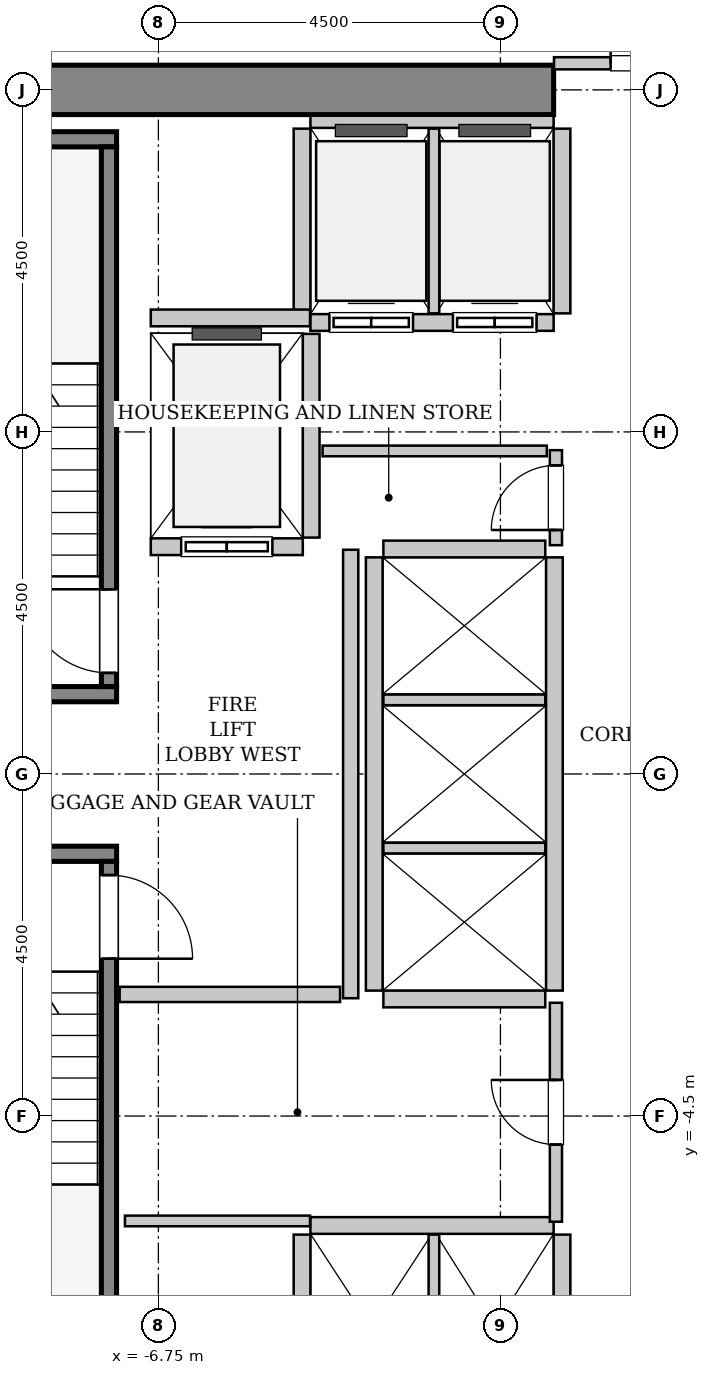
"""IFC4 building model, lengths in metres.
Left out: names, types, materials, properties, quantities, classifications, styles, units other than length and angle.
Written with IfcOpenShell. Run it as: python <this file> out.ifc"""

import sys

from ifc_helpers import new_model, si_unit, direction, frame, frame_2d, origin, place, context, subcontext, project, spatial, rectangle, extrude, source, transform, mapped, element, fill, save


model = new_model("IFC4")
c1 = context("Model", 3, precision=1e-05, world=origin(), true_north=direction((0.0, 1.0)))
c2 = subcontext(c1, "Body", "Model", "MODEL_VIEW")
j1 = project(units=[si_unit("LENGTHUNIT", "METRE"), si_unit("PLANEANGLEUNIT", "RADIAN")], contexts=[c1])
p1 = place(None, origin())
s1 = spatial("IfcSite", under=j1, at=p1, CompositionType="ELEMENT")
p2 = place(p1, origin())
s2 = spatial("IfcBuilding", under=s1, at=p2, CompositionType="ELEMENT")
p3 = place(p2, frame((0.0, 0.0, 63.4)))
s3 = spatial("IfcBuildingStorey", under=s2, at=p3, CompositionType="ELEMENT", Elevation=63.4)
m1 = source(origin(), c2, "Body", "SweptSolid", [
    extrude(rectangle(XDim=10.025, YDim=0.65, at=frame_2d((5.012, 0.0))), origin(), (0.0, 0.0, 1.0), 3.8),
])
p4 = place(p3, frame((-11.575, 9.0, 0.0), z_axis=(0.0, 0.0, 1.0), x_axis=(1.0, 0.0, 0.0)))
e1 = element("IfcWall", 1, at=p4, inside=s3, PredefinedType="SHEAR", context=c2, shape_type="MappedRepresentation", body=[
    mapped(m1, transform((0.0, 0.0, 0.0), x_axis=(1.0, 0.0, 0.0), y_axis=(0.0, 1.0, 0.0), z_axis=(0.0, 0.0, 1.0), scale=1.0)),
])
m2 = source(origin(), c2, "Body", "SweptSolid", [
    extrude(rectangle(XDim=3.4, YDim=0.2, at=frame_2d((1.7, 0.0))), origin(), (0.0, 0.0, 1.0), 3.8),
])
p5 = place(p3, frame((-7.3, 1.05, 0.0), z_axis=(0.0, 0.0, 1.0), x_axis=(-1.0, 0.0, 0.0)))
e2 = element("IfcWall", 2, at=p5, inside=s3, PredefinedType="SOLIDWALL", context=c2, shape_type="MappedRepresentation", body=[
    mapped(m2, transform((0.0, 0.0, 0.0), x_axis=(1.0, 0.0, 0.0), y_axis=(0.0, 1.0, 0.0), z_axis=(0.0, 0.0, 1.0), scale=1.0)),
])
m3 = source(origin(), c2, "Body", "SweptSolid", [
    extrude(rectangle(XDim=3.63, YDim=0.2, at=frame_2d((1.815, 0.0))), origin(), (0.0, 0.0, 1.0), 3.8),
])
p6 = place(p3, frame((-7.3, 8.35, 0.0), z_axis=(0.0, 0.0, 1.0), x_axis=(-1.0, 0.0, 0.0)))
e3 = element("IfcWall", 3, at=p6, inside=s3, PredefinedType="SOLIDWALL", context=c2, shape_type="MappedRepresentation", body=[
    mapped(m3, transform((0.0, 0.0, 0.0), x_axis=(1.0, 0.0, 0.0), y_axis=(0.0, 1.0, 0.0), z_axis=(0.0, 0.0, 1.0), scale=1.0)),
])
m4 = source(origin(), c2, "Body", "SweptSolid", [
    extrude(rectangle(XDim=7.1, YDim=0.2, at=frame_2d((3.55, 0.0))), origin(), (0.0, 0.0, 1.0), 3.8),
])
p7 = place(p3, frame((-7.4, 1.15, 0.0), z_axis=(0.0, 0.0, 1.0), x_axis=(0.0, 1.0, 0.0)))
e4 = element("IfcWall", 4, at=p7, inside=s3, PredefinedType="SOLIDWALL", context=c2, shape_type="MappedRepresentation", body=[
    mapped(m4, transform((0.0, 0.0, 0.0), x_axis=(1.0, 0.0, 0.0), y_axis=(0.0, 1.0, 0.0), z_axis=(0.0, 0.0, 1.0), scale=1.0)),
])
p8 = place(p7, frame((0.18, 0.0, 0.0)))
e5 = element("IfcOpeningElement", 5, at=p8, cuts=e4, PredefinedType="OPENING", context=c2, shape_type="SweptSolid", body=[
    extrude(rectangle(XDim=1.1, YDim=2.15, at=frame_2d((0.55, 1.075))), frame((0.0, 0.11, 0.0), z_axis=(0.0, -1.0, 0.0), x_axis=(1.0, 0.0, 0.0)), (0.0, 0.0, 1.0), 0.22),
])
p9 = place(p3, frame((-10.7, -1.05, 0.0), z_axis=(0.0, 0.0, 1.0), x_axis=(1.0, 0.0, 0.0)))
e6 = element("IfcWall", 6, at=p9, inside=s3, PredefinedType="SOLIDWALL", context=c2, shape_type="MappedRepresentation", body=[
    mapped(m2, transform((0.0, 0.0, 0.0), x_axis=(1.0, 0.0, 0.0), y_axis=(0.0, 1.0, 0.0), z_axis=(0.0, 0.0, 1.0), scale=1.0)),
])
p10 = place(p3, frame((-7.4, -1.15, 0.0), z_axis=(0.0, 0.0, 1.0), x_axis=(0.0, -1.0, 0.0)))
e7 = element("IfcWall", 7, at=p10, inside=s3, PredefinedType="SOLIDWALL", context=c2, shape_type="MappedRepresentation", body=[
    mapped(m4, transform((0.0, 0.0, 0.0), x_axis=(1.0, 0.0, 0.0), y_axis=(0.0, 1.0, 0.0), z_axis=(0.0, 0.0, 1.0), scale=1.0)),
])
p11 = place(p10, frame((0.18, 0.0, 0.0)))
e8 = element("IfcOpeningElement", 8, at=p11, cuts=e7, PredefinedType="OPENING", context=c2, shape_type="SweptSolid", body=[
    extrude(rectangle(XDim=1.1, YDim=2.15, at=frame_2d((0.55, 1.075))), frame((0.0, 0.11, 0.0), z_axis=(0.0, -1.0, 0.0), x_axis=(1.0, 0.0, 0.0)), (0.0, 0.0, 1.0), 0.22),
])
m5 = source(origin(), c2, "Body", "SweptSolid", [
    extrude(rectangle(XDim=2.0, YDim=0.22, at=frame_2d((1.0, 0.0))), origin(), (0.0, 0.0, 1.0), 3.535),
])
p12 = place(p3, frame((-6.85, 2.99, 0.0), z_axis=(0.0, 0.0, 1.0), x_axis=(1.0, 0.0, 0.0)))
e9 = element("IfcWall", 9, at=p12, inside=s3, PredefinedType="SOLIDWALL", context=c2, shape_type="MappedRepresentation", body=[
    mapped(m5, transform((0.0, 0.0, 0.0), x_axis=(1.0, 0.0, 0.0), y_axis=(0.0, 1.0, 0.0), z_axis=(0.0, 0.0, 1.0), scale=1.0)),
])
p13 = place(p12, frame((0.4, 0.0, 0.0)))
e10 = element("IfcOpeningElement", 10, at=p13, cuts=e9, PredefinedType="OPENING", context=c2, shape_type="SweptSolid", body=[
    extrude(rectangle(XDim=1.2, YDim=2.2, at=frame_2d((0.6, 1.1))), frame((0.0, 0.12, 0.0), z_axis=(0.0, -1.0, 0.0), x_axis=(1.0, 0.0, 0.0)), (0.0, 0.0, 1.0), 0.24),
])
m6 = source(origin(), c2, "Body", "SweptSolid", [
    extrude(rectangle(XDim=2.68, YDim=0.22, at=frame_2d((1.34, 0.0))), origin(), (0.0, 0.0, 1.0), 3.535),
])
p14 = place(p3, frame((-4.74, 3.11, 0.0), z_axis=(0.0, 0.0, 1.0), x_axis=(0.0, 1.0, 0.0)))
e11 = element("IfcWall", 11, at=p14, inside=s3, PredefinedType="SOLIDWALL", context=c2, shape_type="MappedRepresentation", body=[
    mapped(m6, transform((0.0, 0.0, 0.0), x_axis=(1.0, 0.0, 0.0), y_axis=(0.0, 1.0, 0.0), z_axis=(0.0, 0.0, 1.0), scale=1.0)),
])
m7 = source(origin(), c2, "Body", "SweptSolid", [
    extrude(rectangle(XDim=3.2, YDim=0.22, at=frame_2d((1.6, 0.0))), origin(), (0.0, 0.0, 1.0), 3.535),
])
p15 = place(p3, frame((-4.75, 5.94, 0.0), z_axis=(0.0, 0.0, 1.0), x_axis=(1.0, 0.0, 0.0)))
e12 = element("IfcWall", 12, at=p15, inside=s3, PredefinedType="SOLIDWALL", context=c2, shape_type="MappedRepresentation", body=[
    mapped(m7, transform((0.0, 0.0, 0.0), x_axis=(1.0, 0.0, 0.0), y_axis=(0.0, 1.0, 0.0), z_axis=(0.0, 0.0, 1.0), scale=1.0)),
])
p16 = place(p15, frame((0.25, 0.0, 0.0)))
e13 = element("IfcOpeningElement", 13, at=p16, cuts=e12, PredefinedType="OPENING", context=c2, shape_type="SweptSolid", body=[
    extrude(rectangle(XDim=1.1, YDim=2.2, at=frame_2d((0.55, 1.1))), frame((0.0, 0.12, 0.0), z_axis=(0.0, -1.0, 0.0), x_axis=(1.0, 0.0, 0.0)), (0.0, 0.0, 1.0), 0.24),
])
p17 = place(p15, frame((1.875, 0.0, 0.0)))
e14 = element("IfcOpeningElement", 14, at=p17, cuts=e12, PredefinedType="OPENING", context=c2, shape_type="SweptSolid", body=[
    extrude(rectangle(XDim=1.1, YDim=2.2, at=frame_2d((0.55, 1.1))), frame((0.0, 0.12, 0.0), z_axis=(0.0, -1.0, 0.0), x_axis=(1.0, 0.0, 0.0)), (0.0, 0.0, 1.0), 0.24),
])
m8 = source(origin(), c2, "Body", "SweptSolid", [
    extrude(rectangle(XDim=3.2, YDim=0.16, at=frame_2d((1.6, 0.0))), origin(), (0.0, 0.0, 1.0), 2.425),
])
p18 = place(p3, frame((-1.55, 8.58, 0.0), z_axis=(0.0, 0.0, 1.0), x_axis=(-1.0, 0.0, 0.0)))
e15 = element("IfcWall", 15, at=p18, inside=s3, PredefinedType="PARTITIONING", context=c2, shape_type="MappedRepresentation", body=[
    mapped(m8, transform((0.0, 0.0, 0.0), x_axis=(1.0, 0.0, 0.0), y_axis=(0.0, 1.0, 0.0), z_axis=(0.0, 0.0, 1.0), scale=1.0)),
])
m9 = source(origin(), c2, "Body", "SweptSolid", [
    extrude(rectangle(XDim=2.43, YDim=0.22, at=frame_2d((1.215, 0.0))), origin(), (0.0, 0.0, 1.0), 3.535),
])
p19 = place(p3, frame((-4.86, 8.49, 0.0), z_axis=(0.0, 0.0, 1.0), x_axis=(0.0, -1.0, 0.0)))
e16 = element("IfcWall", 16, at=p19, inside=s3, PredefinedType="SOLIDWALL", context=c2, shape_type="MappedRepresentation", body=[
    mapped(m9, transform((0.0, 0.0, 0.0), x_axis=(1.0, 0.0, 0.0), y_axis=(0.0, 1.0, 0.0), z_axis=(0.0, 0.0, 1.0), scale=1.0)),
])
m10 = source(origin(), c2, "Body", "SweptSolid", [
    extrude(rectangle(XDim=2.43, YDim=0.14, at=frame_2d((1.215, 0.0))), origin(), (0.0, 0.0, 1.0), 3.535),
])
p20 = place(p3, frame((-3.125, 6.06, 0.0), z_axis=(0.0, 0.0, 1.0), x_axis=(0.0, 1.0, 0.0)))
e17 = element("IfcWall", 17, at=p20, inside=s3, PredefinedType="PARTITIONING", context=c2, shape_type="MappedRepresentation", body=[
    mapped(m10, transform((0.0, 0.0, 0.0), x_axis=(1.0, 0.0, 0.0), y_axis=(0.0, 1.0, 0.0), z_axis=(0.0, 0.0, 1.0), scale=1.0)),
])
p21 = place(p3, frame((-1.44, 6.06, 0.0), z_axis=(0.0, 0.0, 1.0), x_axis=(0.0, 1.0, 0.0)))
e18 = element("IfcWall", 18, at=p21, inside=s3, PredefinedType="SOLIDWALL", context=c2, shape_type="MappedRepresentation", body=[
    mapped(m9, transform((0.0, 0.0, 0.0), x_axis=(1.0, 0.0, 0.0), y_axis=(0.0, 1.0, 0.0), z_axis=(0.0, 0.0, 1.0), scale=1.0)),
])
p22 = place(p3, frame((-1.55, -5.94, 0.0), z_axis=(0.0, 0.0, 1.0), x_axis=(-1.0, 0.0, 0.0)))
e19 = element("IfcWall", 19, at=p22, inside=s3, PredefinedType="SOLIDWALL", context=c2, shape_type="MappedRepresentation", body=[
    mapped(m7, transform((0.0, 0.0, 0.0), x_axis=(1.0, 0.0, 0.0), y_axis=(0.0, 1.0, 0.0), z_axis=(0.0, 0.0, 1.0), scale=1.0)),
])
p23 = place(p3, frame((-4.86, -6.06, 0.0), z_axis=(0.0, 0.0, 1.0), x_axis=(0.0, -1.0, 0.0)))
e20 = element("IfcWall", 20, at=p23, inside=s3, PredefinedType="SOLIDWALL", context=c2, shape_type="MappedRepresentation", body=[
    mapped(m9, transform((0.0, 0.0, 0.0), x_axis=(1.0, 0.0, 0.0), y_axis=(0.0, 1.0, 0.0), z_axis=(0.0, 0.0, 1.0), scale=1.0)),
])
p24 = place(p3, frame((-3.125, -8.49, 0.0), z_axis=(0.0, 0.0, 1.0), x_axis=(0.0, 1.0, 0.0)))
e21 = element("IfcWall", 21, at=p24, inside=s3, PredefinedType="PARTITIONING", context=c2, shape_type="MappedRepresentation", body=[
    mapped(m10, transform((0.0, 0.0, 0.0), x_axis=(1.0, 0.0, 0.0), y_axis=(0.0, 1.0, 0.0), z_axis=(0.0, 0.0, 1.0), scale=1.0)),
])
p25 = place(p3, frame((-1.44, -8.49, 0.0), z_axis=(0.0, 0.0, 1.0), x_axis=(0.0, 1.0, 0.0)))
e22 = element("IfcWall", 22, at=p25, inside=s3, PredefinedType="SOLIDWALL", context=c2, shape_type="MappedRepresentation", body=[
    mapped(m9, transform((0.0, 0.0, 0.0), x_axis=(1.0, 0.0, 0.0), y_axis=(0.0, 1.0, 0.0), z_axis=(0.0, 0.0, 1.0), scale=1.0)),
])
m11 = source(origin(), c2, "Body", "SweptSolid", [
    extrude(rectangle(XDim=5.7, YDim=0.22, at=frame_2d((2.85, 0.0))), origin(), (0.0, 0.0, 1.0), 3.535),
])
for number, where, z_axis, x_axis in (
    (23, (-1.54, -2.85, 0.0), (0.0, 0.0, 1.0), (0.0, 1.0, 0.0)),
    (24, (-3.91, 2.85, 0.0), (0.0, 0.0, 1.0), (0.0, -1.0, 0.0)),
):
    element("IfcWall", number, at=place(p3, frame(where, z_axis=z_axis, x_axis=x_axis)), inside=s3, PredefinedType="SOLIDWALL", context=c2, shape_type="MappedRepresentation", body=[
        mapped(m11, transform((0.0, 0.0, 0.0), x_axis=(1.0, 0.0, 0.0), y_axis=(0.0, 1.0, 0.0), z_axis=(0.0, 0.0, 1.0), scale=1.0)),
    ])
m12 = source(origin(), c2, "Body", "SweptSolid", [
    extrude(rectangle(XDim=2.13, YDim=0.22, at=frame_2d((1.065, 0.0))), origin(), (0.0, 0.0, 1.0), 3.535),
])
p26 = place(p3, frame((-3.79, -2.96, 0.0), z_axis=(0.0, 0.0, 1.0), x_axis=(1.0, 0.0, 0.0)))
e25 = element("IfcWall", 25, at=p26, inside=s3, PredefinedType="SOLIDWALL", context=c2, shape_type="MappedRepresentation", body=[
    mapped(m12, transform((0.0, 0.0, 0.0), x_axis=(1.0, 0.0, 0.0), y_axis=(0.0, 1.0, 0.0), z_axis=(0.0, 0.0, 1.0), scale=1.0)),
])
m13 = source(origin(), c2, "Body", "SweptSolid", [
    extrude(rectangle(XDim=2.13, YDim=0.14, at=frame_2d((1.065, 0.0))), origin(), (0.0, 0.0, 1.0), 3.535),
])
for number, where, z_axis, x_axis in (
    (26, (-3.79, -0.975, 0.0), (0.0, 0.0, 1.0), (1.0, 0.0, 0.0)),
    (27, (-3.79, 0.975, 0.0), (0.0, 0.0, 1.0), (1.0, 0.0, 0.0)),
):
    element("IfcWall", number, at=place(p3, frame(where, z_axis=z_axis, x_axis=x_axis)), inside=s3, PredefinedType="PARTITIONING", context=c2, shape_type="MappedRepresentation", body=[
        mapped(m13, transform((0.0, 0.0, 0.0), x_axis=(1.0, 0.0, 0.0), y_axis=(0.0, 1.0, 0.0), z_axis=(0.0, 0.0, 1.0), scale=1.0)),
    ])
p27 = place(p3, frame((-1.66, 2.96, 0.0), z_axis=(0.0, 0.0, 1.0), x_axis=(-1.0, 0.0, 0.0)))
e28 = element("IfcWall", 28, at=p27, inside=s3, PredefinedType="SOLIDWALL", context=c2, shape_type="MappedRepresentation", body=[
    mapped(m12, transform((0.0, 0.0, 0.0), x_axis=(1.0, 0.0, 0.0), y_axis=(0.0, 1.0, 0.0), z_axis=(0.0, 0.0, 1.0), scale=1.0)),
])
m14 = source(origin(), c2, "Body", "SweptSolid", [
    extrude(rectangle(XDim=2.095, YDim=0.22, at=frame_2d((1.048, 0.0))), origin(), (0.0, 0.0, 1.0), 3.535),
])
p28 = place(p3, frame((-6.85, 6.0, 0.0), z_axis=(0.0, 0.0, 1.0), x_axis=(1.0, 0.0, 0.0)))
e29 = element("IfcWall", 29, at=p28, inside=s3, PredefinedType="SOLIDWALL", context=c2, shape_type="MappedRepresentation", body=[
    mapped(m14, transform((0.0, 0.0, 0.0), x_axis=(1.0, 0.0, 0.0), y_axis=(0.0, 1.0, 0.0), z_axis=(0.0, 0.0, 1.0), scale=1.0)),
])
m15 = source(origin(), c2, "Body", "SweptSolid", [
    extrude(rectangle(XDim=5.9, YDim=0.2, at=frame_2d((2.95, 0.0))), origin(), (0.0, 0.0, 1.0), 3.535),
])
p29 = place(p3, frame((-4.22, -2.95, 0.0), z_axis=(0.0, 0.0, 1.0), x_axis=(0.0, 1.0, 0.0)))
e30 = element("IfcWall", 30, at=p29, inside=s3, PredefinedType="PARTITIONING", context=c2, shape_type="MappedRepresentation", body=[
    mapped(m15, transform((0.0, 0.0, 0.0), x_axis=(1.0, 0.0, 0.0), y_axis=(0.0, 1.0, 0.0), z_axis=(0.0, 0.0, 1.0), scale=1.0)),
])
m16 = source(origin(), c2, "Body", "SweptSolid", [
    extrude(rectangle(XDim=2.9, YDim=0.2, at=frame_2d((1.45, 0.0))), origin(), (0.0, 0.0, 1.0), 3.535),
])
p30 = place(p3, frame((-7.26, -2.9, 0.0), z_axis=(0.0, 0.0, 1.0), x_axis=(1.0, 0.0, 0.0)))
e31 = element("IfcWall", 31, at=p30, inside=s3, PredefinedType="PARTITIONING", context=c2, shape_type="MappedRepresentation", body=[
    mapped(m16, transform((0.0, 0.0, 0.0), x_axis=(1.0, 0.0, 0.0), y_axis=(0.0, 1.0, 0.0), z_axis=(0.0, 0.0, 1.0), scale=1.0)),
])
m17 = source(origin(), c2, "Body", "SweptSolid", [
    extrude(rectangle(XDim=3.09, YDim=0.16, at=frame_2d((1.545, 0.0))), origin(), (0.0, 0.0, 1.0), 2.425),
])
p31 = place(p3, frame((-1.545, 9.35, 0.0), z_axis=(0.0, 0.0, 1.0), x_axis=(1.0, 0.0, 0.0)))
e32 = element("IfcWall", 32, at=p31, inside=s3, PredefinedType="PARTITIONING", context=c2, shape_type="MappedRepresentation", body=[
    mapped(m17, transform((0.0, 0.0, 0.0), x_axis=(1.0, 0.0, 0.0), y_axis=(0.0, 1.0, 0.0), z_axis=(0.0, 0.0, 1.0), scale=1.0)),
])
p32 = place(p31, frame((0.745, 0.0, 0.0)))
e33 = element("IfcOpeningElement", 33, at=p32, cuts=e32, PredefinedType="OPENING", context=c2, shape_type="SweptSolid", body=[
    extrude(rectangle(XDim=1.6, YDim=2.3, at=frame_2d((0.8, 1.15))), frame((0.0, 0.09, 0.0), z_axis=(0.0, -1.0, 0.0), x_axis=(1.0, 0.0, 0.0)), (0.0, 0.0, 1.0), 0.18),
])
m18 = source(origin(), c2, "Body", "SweptSolid", [
    extrude(rectangle(XDim=1.25, YDim=0.16, at=frame_2d((0.625, 0.0))), origin(), (0.0, 0.0, 1.0), 3.535),
])
p33 = place(p3, frame((-1.52, 3.01, 0.0), z_axis=(0.0, 0.0, 1.0), x_axis=(0.0, 1.0, 0.0)))
e34 = element("IfcWall", 34, at=p33, inside=s3, PredefinedType="PARTITIONING", context=c2, shape_type="MappedRepresentation", body=[
    mapped(m18, transform((0.0, 0.0, 0.0), x_axis=(1.0, 0.0, 0.0), y_axis=(0.0, 1.0, 0.0), z_axis=(0.0, 0.0, 1.0), scale=1.0)),
])
p34 = place(p33, frame((0.2, 0.0, 0.0)))
e35 = element("IfcOpeningElement", 35, at=p34, cuts=e34, PredefinedType="OPENING", context=c2, shape_type="SweptSolid", body=[
    extrude(rectangle(XDim=0.85, YDim=2.1, at=frame_2d((0.425, 1.05))), frame((0.0, 0.09, 0.0), z_axis=(0.0, -1.0, 0.0), x_axis=(1.0, 0.0, 0.0)), (0.0, 0.0, 1.0), 0.18),
])
m19 = source(origin(), c2, "Body", "SweptSolid", [
    extrude(rectangle(XDim=2.95, YDim=0.14, at=frame_2d((1.475, 0.0))), origin(), (0.0, 0.0, 1.0), 3.535),
])
p35 = place(p3, frame((-4.59, 4.25, 0.0), z_axis=(0.0, 0.0, 1.0), x_axis=(1.0, 0.0, 0.0)))
e36 = element("IfcWall", 36, at=p35, inside=s3, PredefinedType="PARTITIONING", context=c2, shape_type="MappedRepresentation", body=[
    mapped(m19, transform((0.0, 0.0, 0.0), x_axis=(1.0, 0.0, 0.0), y_axis=(0.0, 1.0, 0.0), z_axis=(0.0, 0.0, 1.0), scale=1.0)),
])
m20 = source(origin(), c2, "Body", "SweptSolid", [
    extrude(rectangle(XDim=2.88, YDim=0.16, at=frame_2d((1.44, 0.0))), origin(), (0.0, 0.0, 1.0), 3.535),
])
p36 = place(p3, frame((-1.52, -5.89, 0.0), z_axis=(0.0, 0.0, 1.0), x_axis=(0.0, 1.0, 0.0)))
e37 = element("IfcWall", 37, at=p36, inside=s3, PredefinedType="PARTITIONING", context=c2, shape_type="MappedRepresentation", body=[
    mapped(m20, transform((0.0, 0.0, 0.0), x_axis=(1.0, 0.0, 0.0), y_axis=(0.0, 1.0, 0.0), z_axis=(0.0, 0.0, 1.0), scale=1.0)),
])
p37 = place(p36, frame((1.015, 0.0, 0.0)))
e38 = element("IfcOpeningElement", 38, at=p37, cuts=e37, PredefinedType="OPENING", context=c2, shape_type="SweptSolid", body=[
    extrude(rectangle(XDim=0.85, YDim=2.1, at=frame_2d((0.425, 1.05))), frame((0.0, 0.09, 0.0), z_axis=(0.0, -1.0, 0.0), x_axis=(1.0, 0.0, 0.0)), (0.0, 0.0, 1.0), 0.18),
])
m21 = source(origin(), c2, "Body", "SweptSolid", [
    extrude(rectangle(XDim=2.435, YDim=0.14, at=frame_2d((1.218, 0.0))), origin(), (0.0, 0.0, 1.0), 3.535),
])
p38 = place(p3, frame((-7.19, -5.88, 0.0), z_axis=(0.0, 0.0, 1.0), x_axis=(1.0, 0.0, 0.0)))
e39 = element("IfcWall", 39, at=p38, inside=s3, PredefinedType="PARTITIONING", context=c2, shape_type="MappedRepresentation", body=[
    mapped(m21, transform((0.0, 0.0, 0.0), x_axis=(1.0, 0.0, 0.0), y_axis=(0.0, 1.0, 0.0), z_axis=(0.0, 0.0, 1.0), scale=1.0)),
])
m22 = source(origin(), c2, "Body", "SweptSolid", [
    extrude(rectangle(XDim=1.1, YDim=2.15, at=frame_2d((0.55, 1.075))), frame((0.0, 0.025, 0.0), z_axis=(0.0, -1.0, 0.0), x_axis=(1.0, 0.0, 0.0)), (0.0, 0.0, 1.0), 0.05),
])
p39 = place(p8, origin())
e40 = element("IfcDoor", 40, at=p39, inside=s3, OperationType="SINGLE_SWING_RIGHT", PredefinedType="DOOR", context=c2, shape_type="MappedRepresentation", body=[
    mapped(m22, transform((0.0, 0.0, 0.0), x_axis=(1.0, 0.0, 0.0), y_axis=(0.0, 1.0, 0.0), z_axis=(0.0, 0.0, 1.0), scale=1.0)),
])
fill(e5, e40)
p40 = place(p11, origin())
e41 = element("IfcDoor", 41, at=p40, inside=s3, OperationType="SINGLE_SWING_RIGHT", PredefinedType="DOOR", context=c2, shape_type="MappedRepresentation", body=[
    mapped(m22, transform((0.0, 0.0, 0.0), x_axis=(1.0, 0.0, 0.0), y_axis=(0.0, 1.0, 0.0), z_axis=(0.0, 0.0, 1.0), scale=1.0)),
])
fill(e8, e41)
m23 = source(origin(), c2, "Body", "SweptSolid", [
    extrude(rectangle(XDim=1.2, YDim=2.2, at=frame_2d((0.6, 1.1))), frame((0.0, 0.025, 0.0), z_axis=(0.0, -1.0, 0.0), x_axis=(1.0, 0.0, 0.0)), (0.0, 0.0, 1.0), 0.05),
])
p41 = place(p13, origin())
e42 = element("IfcDoor", 42, at=p41, inside=s3, OperationType="SLIDING_TO_LEFT", PredefinedType="DOOR", context=c2, shape_type="MappedRepresentation", body=[
    mapped(m23, transform((0.0, 0.0, 0.0), x_axis=(1.0, 0.0, 0.0), y_axis=(0.0, 1.0, 0.0), z_axis=(0.0, 0.0, 1.0), scale=1.0)),
])
fill(e10, e42)
m24 = source(origin(), c2, "Body", "SweptSolid", [
    extrude(rectangle(XDim=1.1, YDim=2.2, at=frame_2d((0.55, 1.1))), frame((0.0, 0.025, 0.0), z_axis=(0.0, -1.0, 0.0), x_axis=(1.0, 0.0, 0.0)), (0.0, 0.0, 1.0), 0.05),
])
p42 = place(p16, origin())
e43 = element("IfcDoor", 43, at=p42, inside=s3, OperationType="DOUBLE_DOOR_SLIDING", PredefinedType="DOOR", context=c2, shape_type="MappedRepresentation", body=[
    mapped(m24, transform((0.0, 0.0, 0.0), x_axis=(1.0, 0.0, 0.0), y_axis=(0.0, 1.0, 0.0), z_axis=(0.0, 0.0, 1.0), scale=1.0)),
])
fill(e13, e43)
p43 = place(p17, origin())
e44 = element("IfcDoor", 44, at=p43, inside=s3, OperationType="DOUBLE_DOOR_SLIDING", PredefinedType="DOOR", context=c2, shape_type="MappedRepresentation", body=[
    mapped(m24, transform((0.0, 0.0, 0.0), x_axis=(1.0, 0.0, 0.0), y_axis=(0.0, 1.0, 0.0), z_axis=(0.0, 0.0, 1.0), scale=1.0)),
])
fill(e14, e44)
m25 = source(origin(), c2, "Body", "SweptSolid", [
    extrude(rectangle(XDim=1.6, YDim=2.3, at=frame_2d((0.8, 1.15))), frame((0.0, 0.025, 0.0), z_axis=(0.0, -1.0, 0.0), x_axis=(1.0, 0.0, 0.0)), (0.0, 0.0, 1.0), 0.05),
])
p44 = place(p32, origin())
e45 = element("IfcDoor", 45, at=p44, inside=s3, OperationType="DOUBLE_DOOR_SINGLE_SWING", PredefinedType="DOOR", context=c2, shape_type="MappedRepresentation", body=[
    mapped(m25, transform((0.0, 0.0, 0.0), x_axis=(1.0, 0.0, 0.0), y_axis=(0.0, 1.0, 0.0), z_axis=(0.0, 0.0, 1.0), scale=1.0)),
])
fill(e33, e45)
m26 = source(origin(), c2, "Body", "SweptSolid", [
    extrude(rectangle(XDim=0.85, YDim=2.1, at=frame_2d((0.425, 1.05))), frame((0.0, 0.025, 0.0), z_axis=(0.0, -1.0, 0.0), x_axis=(1.0, 0.0, 0.0)), (0.0, 0.0, 1.0), 0.05),
])
p45 = place(p34, origin())
e46 = element("IfcDoor", 46, at=p45, inside=s3, OperationType="SINGLE_SWING_LEFT", PredefinedType="DOOR", context=c2, shape_type="MappedRepresentation", body=[
    mapped(m26, transform((0.0, 0.0, 0.0), x_axis=(1.0, 0.0, 0.0), y_axis=(0.0, 1.0, 0.0), z_axis=(0.0, 0.0, 1.0), scale=1.0)),
])
fill(e35, e46)
p46 = place(p37, origin())
e47 = element("IfcDoor", 47, at=p46, inside=s3, OperationType="SINGLE_SWING_RIGHT", PredefinedType="DOOR", context=c2, shape_type="MappedRepresentation", body=[
    mapped(m26, transform((0.0, 0.0, 0.0), x_axis=(1.0, 0.0, 0.0), y_axis=(0.0, 1.0, 0.0), z_axis=(0.0, 0.0, 1.0), scale=1.0)),
])
fill(e38, e47)
save(model, sys.argv[1])
